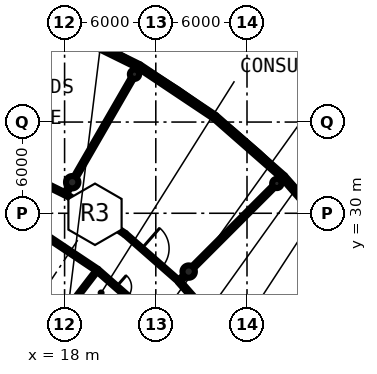
"""IFC4 building model, lengths in metres.
Left out: names, types, materials, properties, quantities, classifications, styles, units other than length and angle.
Written with IfcOpenShell. Run it as: python <this file> out.ifc"""

import sys

from ifc_helpers import new_model, si_unit, direction, frame, frame_2d, origin, origin_2d, place, context, subcontext, project, spatial, rectangle, hollow_circle, extrude, element, fill, save


model = new_model("IFC4")
c1 = context("Model", 3, precision=1e-05, world=origin(), true_north=direction((0.0, 1.0)))
c2 = subcontext(c1, "Body", "Model", "MODEL_VIEW")
j1 = project(units=[si_unit("LENGTHUNIT", "METRE"), si_unit("PLANEANGLEUNIT", "RADIAN")], contexts=[c1])
p1 = place(None, origin())
s1 = spatial("IfcSite", under=j1, at=p1, CompositionType="ELEMENT")
p2 = place(p1, origin())
s2 = spatial("IfcBuilding", under=s1, at=p2, CompositionType="ELEMENT")
p3 = place(p2, frame((0.0, 0.0, 5.4)))
s3 = spatial("IfcBuildingStorey", under=s2, at=p3, CompositionType="ELEMENT", Elevation=5.4)
for number, where, z_axis, x_axis in (
    (1, (26.163, 26.163, 0.0), (0.0, 0.0, 1.0), (1.0, 0.0, 0.0)),
    (2, (18.5, 32.043, 0.0), (0.0, 0.0, 1.0), (1.0, 0.0, 0.0)),
):
    element("IfcColumn", number, at=place(p3, frame(where, z_axis=z_axis, x_axis=x_axis)), inside=s3, PredefinedType="COLUMN", context=c2, shape_type="SweptSolid", body=[
        extrude(hollow_circle(Radius=0.406, WallThickness=0.03, at=origin_2d()), origin(), (0.0, 0.0, 1.0), 4.2),
    ])
for number, where, z_axis, x_axis in (
    (3, (31.961, 31.961, 0.0), (0.0, 0.0, 1.0), (1.0, 0.0, 0.0)),
    (4, (22.6, 39.144, 0.0), (0.0, 0.0, 1.0), (1.0, 0.0, 0.0)),
):
    element("IfcColumn", number, at=place(p3, frame(where, z_axis=z_axis, x_axis=x_axis)), inside=s3, PredefinedType="COLUMN", context=c2, shape_type="SweptSolid", body=[
        extrude(hollow_circle(Radius=0.305, WallThickness=0.025, at=origin_2d()), origin(), (0.0, 0.0, 1.0), 4.2),
    ])
p4 = place(p3, frame((36.336, 27.881, 0.0), z_axis=(0.0, 0.0, 1.0), x_axis=(-0.659450342916, 0.751748126189, 0.0)))
e5 = element("IfcWall", 5, at=p4, inside=s3, PredefinedType="SOLIDWALL", context=c2, shape_type="SweptSolid", body=[
    extrude(rectangle(XDim=5.991, YDim=0.3, at=frame_2d((2.996, 0.0))), origin(), (0.0, 0.0, 1.0), 3.7),
])
p5 = place(p4, frame((1.495, 0.0, 1.0)))
e6 = element("IfcOpeningElement", 6, at=p5, cuts=e5, PredefinedType="OPENING", context=c2, shape_type="SweptSolid", body=[
    extrude(rectangle(XDim=3.0, YDim=2.0, at=frame_2d((1.5, 1.0))), frame((0.0, 0.16, 0.0), z_axis=(0.0, -1.0, 0.0), x_axis=(1.0, 0.0, 0.0)), (0.0, 0.0, 1.0), 0.32),
])
p6 = place(p3, frame((32.385, 32.385, 0.0), z_axis=(0.0, 0.0, 1.0), x_axis=(-0.751748126189, 0.659450342916, 0.0)))
e7 = element("IfcWall", 7, at=p6, inside=s3, PredefinedType="SOLIDWALL", context=c2, shape_type="SweptSolid", body=[
    extrude(rectangle(XDim=5.991, YDim=0.3, at=frame_2d((2.996, 0.0))), origin(), (0.0, 0.0, 1.0), 3.7),
])
p7 = place(p6, frame((1.495, 0.0, 1.0)))
e8 = element("IfcOpeningElement", 8, at=p7, cuts=e7, PredefinedType="OPENING", context=c2, shape_type="SweptSolid", body=[
    extrude(rectangle(XDim=3.0, YDim=2.0, at=frame_2d((1.5, 1.0))), frame((0.0, 0.16, 0.0), z_axis=(0.0, -1.0, 0.0), x_axis=(1.0, 0.0, 0.0)), (0.0, 0.0, 1.0), 0.32),
])
p8 = place(p3, frame((27.881, 36.336, 0.0), z_axis=(0.0, 0.0, 1.0), x_axis=(-0.831485590074, 0.55554631985, 0.0)))
e9 = element("IfcWall", 9, at=p8, inside=s3, PredefinedType="SOLIDWALL", context=c2, shape_type="SweptSolid", body=[
    extrude(rectangle(XDim=5.991, YDim=0.3, at=frame_2d((2.995, 0.0))), origin(), (0.0, 0.0, 1.0), 3.7),
])
p9 = place(p8, frame((1.495, 0.0, 1.0)))
e10 = element("IfcOpeningElement", 10, at=p9, cuts=e9, PredefinedType="OPENING", context=c2, shape_type="SweptSolid", body=[
    extrude(rectangle(XDim=3.0, YDim=2.0, at=frame_2d((1.5, 1.0))), frame((0.0, 0.16, 0.0), z_axis=(0.0, -1.0, 0.0), x_axis=(1.0, 0.0, 0.0)), (0.0, 0.0, 1.0), 0.32),
])
p10 = place(p3, frame((22.9, 39.664, 0.0), z_axis=(0.0, 0.0, 1.0), x_axis=(-0.896850939151, 0.44233289833, 0.0)))
e11 = element("IfcWall", 11, at=p10, inside=s3, PredefinedType="SOLIDWALL", context=c2, shape_type="SweptSolid", body=[
    extrude(rectangle(XDim=5.991, YDim=0.3, at=frame_2d((2.995, 0.0))), origin(), (0.0, 0.0, 1.0), 3.7),
])
p11 = place(p10, frame((1.495, 0.0, 1.0)))
e12 = element("IfcOpeningElement", 12, at=p11, cuts=e11, PredefinedType="OPENING", context=c2, shape_type="SweptSolid", body=[
    extrude(rectangle(XDim=3.0, YDim=2.0, at=frame_2d((1.5, 1.0))), frame((0.0, 0.16, 0.0), z_axis=(0.0, -1.0, 0.0), x_axis=(1.0, 0.0, 0.0)), (0.0, 0.0, 1.0), 0.32),
])
p12 = place(p3, frame((14.976, 19.516, 0.0), z_axis=(0.0, 0.0, 1.0), x_axis=(0.608691402198, 0.793407068843, 0.0)))
e13 = element("IfcWall", 13, at=p12, inside=s3, PredefinedType="PARTITIONING", context=c2, shape_type="SweptSolid", body=[
    extrude(rectangle(XDim=8.5, YDim=0.15, at=frame_2d((4.25, 0.0))), origin(), (0.0, 0.0, 1.0), 3.7),
])
p13 = place(p3, frame((18.052, 31.263, 0.0), z_axis=(0.0, 0.0, 1.0), x_axis=(0.499919672301, 0.866071776036, 0.0)))
e14 = element("IfcWall", 14, at=p13, inside=s3, PredefinedType="PARTITIONING", context=c2, shape_type="SweptSolid", body=[
    extrude(rectangle(XDim=0.5, YDim=0.2, at=frame_2d((0.25, 0.0))), origin(), (0.0, 0.0, 1.0), 3.7),
])
p14 = place(p3, frame((18.701, 32.388, 0.0), z_axis=(0.0, 0.0, 1.0), x_axis=(0.500101881357, 0.865966574565, 0.0)))
e15 = element("IfcWall", 15, at=p14, inside=s3, PredefinedType="PARTITIONING", context=c2, shape_type="SweptSolid", body=[
    extrude(rectangle(XDim=7.5, YDim=0.2, at=frame_2d((3.75, 0.0))), origin(), (0.0, 0.0, 1.0), 3.7),
])
p15 = place(p3, frame((25.527, 25.527, 0.0), z_axis=(0.0, 0.0, 1.0), x_axis=(0.707106781187, 0.707106781187, 0.0)))
e16 = element("IfcWall", 16, at=p15, inside=s3, PredefinedType="PARTITIONING", context=c2, shape_type="SweptSolid", body=[
    extrude(rectangle(XDim=0.493, YDim=0.2, at=frame_2d((0.247, 0.0))), origin(), (0.0, 0.0, 1.0), 3.7),
])
p16 = place(p3, frame((26.45, 26.45, 0.0), z_axis=(0.0, 0.0, 1.0), x_axis=(0.707106781187, 0.707106781187, 0.0)))
e17 = element("IfcWall", 17, at=p16, inside=s3, PredefinedType="PARTITIONING", context=c2, shape_type="SweptSolid", body=[
    extrude(rectangle(XDim=7.49, YDim=0.2, at=frame_2d((3.745, 0.0))), origin(), (0.0, 0.0, 1.0), 3.7),
])
p17 = place(p3, frame((16.55, 28.665, 0.0), z_axis=(0.0, 0.0, 1.0), x_axis=(0.831503319646, -0.555519783102, 0.0)))
e18 = element("IfcWall", 18, at=p17, inside=s3, PredefinedType="PARTITIONING", context=c2, shape_type="SweptSolid", body=[
    extrude(rectangle(XDim=4.329, YDim=0.2, at=frame_2d((2.165, 0.0))), origin(), (0.0, 0.0, 1.0), 3.7),
])
p18 = place(p3, frame((20.15, 26.26, 0.0), z_axis=(0.0, 0.0, 1.0), x_axis=(0.75180422834, -0.659386383125, 0.0)))
e19 = element("IfcWall", 19, at=p18, inside=s3, PredefinedType="PARTITIONING", context=c2, shape_type="SweptSolid", body=[
    extrude(rectangle(XDim=4.33, YDim=0.2, at=frame_2d((2.165, 0.0))), origin(), (0.0, 0.0, 1.0), 3.7),
])
p19 = place(p18, frame((1.665, 0.0, 0.0)))
e20 = element("IfcOpeningElement", 20, at=p19, cuts=e19, PredefinedType="OPENING", context=c2, shape_type="SweptSolid", body=[
    extrude(rectangle(XDim=1.0, YDim=2.3, at=frame_2d((0.5, 1.15))), frame((0.0, 0.11, 0.0), z_axis=(0.0, -1.0, 0.0), x_axis=(1.0, 0.0, 0.0)), (0.0, 0.0, 1.0), 0.22),
])
p20 = place(p3, frame((13.815, 33.352, 0.0), z_axis=(0.0, 0.0, 1.0), x_axis=(0.896905425474, -0.442222407568, 0.0)))
e21 = element("IfcWall", 21, at=p20, inside=s3, PredefinedType="PARTITIONING", context=c2, shape_type="SweptSolid", body=[
    extrude(rectangle(XDim=4.722, YDim=0.2, at=frame_2d((2.361, 0.0))), origin(), (0.0, 0.0, 1.0), 3.7),
])
p21 = place(p3, frame((18.05, 31.264, 0.0), z_axis=(0.0, 0.0, 1.0), x_axis=(0.831397496099, -0.555678147384, 0.0)))
e22 = element("IfcWall", 22, at=p21, inside=s3, PredefinedType="PARTITIONING", context=c2, shape_type="SweptSolid", body=[
    extrude(rectangle(XDim=4.722, YDim=0.15, at=frame_2d((2.361, 0.0))), origin(), (0.0, 0.0, 1.0), 3.7),
])
p22 = place(p3, frame((21.976, 28.64, 0.0), z_axis=(0.0, 0.0, 1.0), x_axis=(0.751983893099, -0.659181480716, 0.0)))
e23 = element("IfcWall", 23, at=p22, inside=s3, PredefinedType="PARTITIONING", context=c2, shape_type="SweptSolid", body=[
    extrude(rectangle(XDim=4.722, YDim=0.15, at=frame_2d((2.361, 0.0))), origin(), (0.0, 0.0, 1.0), 3.7),
])
p23 = place(p22, frame((1.461, 0.0, 0.0)))
e24 = element("IfcOpeningElement", 24, at=p23, cuts=e23, PredefinedType="OPENING", context=c2, shape_type="SweptSolid", body=[
    extrude(rectangle(XDim=1.8, YDim=2.3, at=frame_2d((0.9, 1.15))), frame((0.0, 0.085, 0.0), z_axis=(0.0, -1.0, 0.0), x_axis=(1.0, 0.0, 0.0)), (0.0, 0.0, 1.0), 0.17),
])
p24 = place(p3, frame((25.527, 25.527, 0.0), z_axis=(0.0, 0.0, 1.0), x_axis=(0.659181480716, -0.751983893099, 0.0)))
e25 = element("IfcWall", 25, at=p24, inside=s3, PredefinedType="PARTITIONING", context=c2, shape_type="SweptSolid", body=[
    extrude(rectangle(XDim=4.722, YDim=0.2, at=frame_2d((2.361, 0.0))), origin(), (0.0, 0.0, 1.0), 3.7),
])
p25 = place(p7, origin())
e26 = element("IfcWindow", 26, at=p25, inside=s3, PartitioningType="SINGLE_PANEL", PredefinedType="WINDOW", context=c2, shape_type="SweptSolid", body=[
    extrude(rectangle(XDim=3.0, YDim=2.0, at=frame_2d((1.5, 1.0))), frame((0.0, 0.03, 0.0), z_axis=(0.0, -1.0, 0.0), x_axis=(1.0, 0.0, 0.0)), (0.0, 0.0, 1.0), 0.06),
])
fill(e8, e26)
p26 = place(p9, origin())
e27 = element("IfcWindow", 27, at=p26, inside=s3, PartitioningType="SINGLE_PANEL", PredefinedType="WINDOW", context=c2, shape_type="SweptSolid", body=[
    extrude(rectangle(XDim=3.0, YDim=2.0, at=frame_2d((1.5, 1.0))), frame((0.0, 0.03, 0.0), z_axis=(0.0, -1.0, 0.0), x_axis=(1.0, 0.0, 0.0)), (0.0, 0.0, 1.0), 0.06),
])
fill(e10, e27)
p27 = place(p11, origin())
e28 = element("IfcWindow", 28, at=p27, inside=s3, PartitioningType="SINGLE_PANEL", PredefinedType="WINDOW", context=c2, shape_type="SweptSolid", body=[
    extrude(rectangle(XDim=3.0, YDim=2.0, at=frame_2d((1.5, 1.0))), frame((0.0, 0.03, 0.0), z_axis=(0.0, -1.0, 0.0), x_axis=(1.0, 0.0, 0.0)), (0.0, 0.0, 1.0), 0.06),
])
fill(e12, e28)
p28 = place(p19, origin())
e29 = element("IfcDoor", 29, at=p28, inside=s3, OperationType="SINGLE_SWING_LEFT", PredefinedType="DOOR", context=c2, shape_type="SweptSolid", body=[
    extrude(rectangle(XDim=1.0, YDim=2.3, at=frame_2d((0.5, 1.15))), frame((0.0, 0.025, 0.0), z_axis=(0.0, -1.0, 0.0), x_axis=(1.0, 0.0, 0.0)), (0.0, 0.0, 1.0), 0.05),
])
fill(e20, e29)
p29 = place(p23, origin())
e30 = element("IfcDoor", 30, at=p29, inside=s3, OperationType="DOUBLE_DOOR_SINGLE_SWING", PredefinedType="DOOR", context=c2, shape_type="SweptSolid", body=[
    extrude(rectangle(XDim=1.8, YDim=2.3, at=frame_2d((0.9, 1.15))), frame((0.0, 0.025, 0.0), z_axis=(0.0, -1.0, 0.0), x_axis=(1.0, 0.0, 0.0)), (0.0, 0.0, 1.0), 0.05),
])
fill(e24, e30)
save(model, sys.argv[1])
